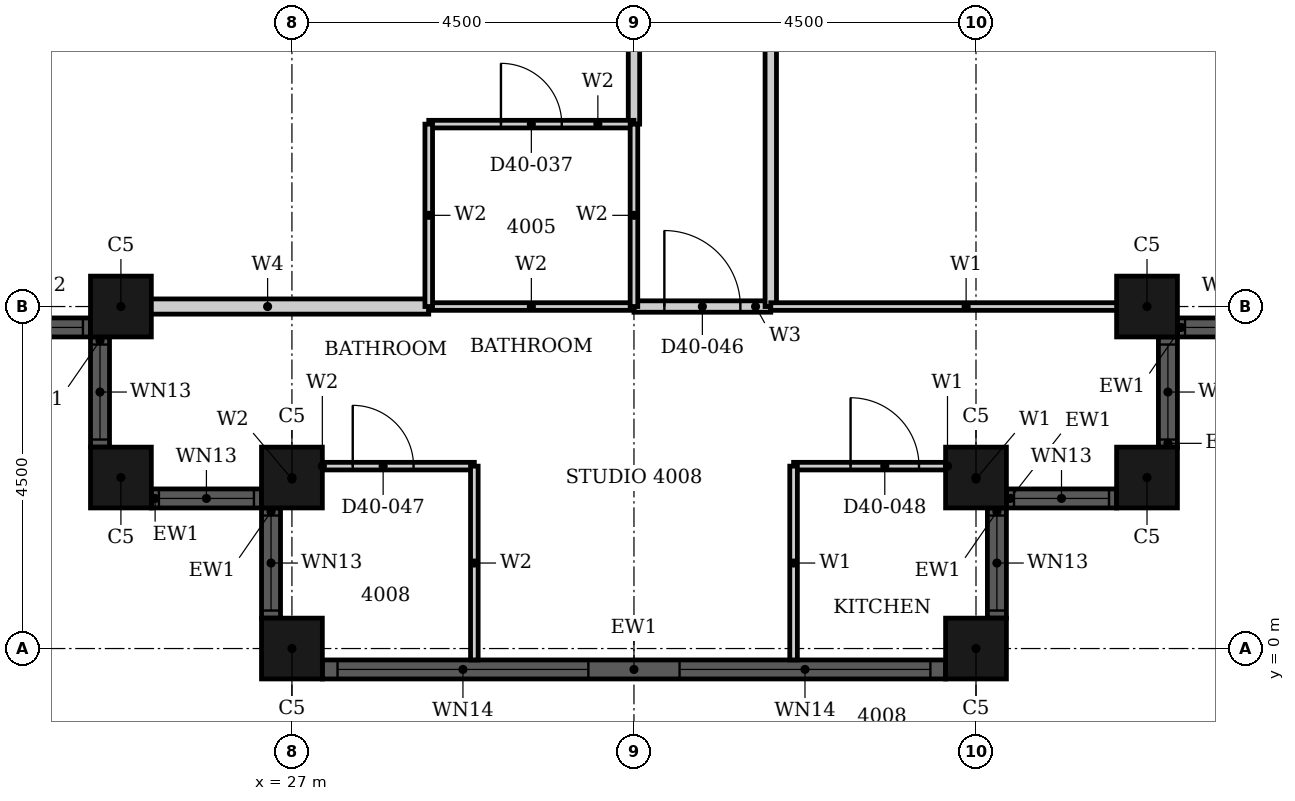
"""IFC4 building model, lengths in metres.
Left out: names, types, materials, properties, quantities, classifications, styles, units other than length and angle.
Written with IfcOpenShell. Run it as: python <this file> out.ifc"""

import sys

from ifc_helpers import new_model, si_unit, direction, frame, frame_2d, origin, origin_2d, place, context, subcontext, project, spatial, rectangle, hollow_rectangle, extrude, element, fill, save


model = new_model("IFC4")
c1 = context("Model", 3, precision=1e-05, world=origin(), true_north=direction((0.0, 1.0)))
c2 = subcontext(c1, "Body", "Model", "MODEL_VIEW")
j1 = project(units=[si_unit("LENGTHUNIT", "METRE"), si_unit("PLANEANGLEUNIT", "RADIAN")], contexts=[c1])
p1 = place(None, origin())
s1 = spatial("IfcSite", under=j1, at=p1, CompositionType="ELEMENT")
p2 = place(p1, origin())
s2 = spatial("IfcBuilding", under=s1, at=p2, CompositionType="ELEMENT")
p3 = place(p2, frame((0.0, 0.0, 161.7)))
s3 = spatial("IfcBuildingStorey", under=s2, at=p3, CompositionType="ELEMENT", Elevation=161.7)
for number, where, z_axis, x_axis in (
    (1, (24.75, 4.5, 0.0), (0.0, 0.0, 1.0), (1.0, 0.0, 0.0)),
    (2, (24.75, 2.25, 0.0), (0.0, 0.0, 1.0), (1.0, 0.0, 0.0)),
    (3, (27.0, 2.25, 0.0), (0.0, 0.0, 1.0), (1.0, 0.0, 0.0)),
    (4, (27.0, 0.0, 0.0), (0.0, 0.0, 1.0), (1.0, 0.0, 0.0)),
    (5, (36.0, 0.0, 0.0), (0.0, 0.0, 1.0), (1.0, 0.0, 0.0)),
    (6, (36.0, 2.25, 0.0), (0.0, 0.0, 1.0), (1.0, 0.0, 0.0)),
    (7, (38.25, 2.25, 0.0), (0.0, 0.0, 1.0), (1.0, 0.0, 0.0)),
    (8, (38.25, 4.5, 0.0), (0.0, 0.0, 1.0), (1.0, 0.0, 0.0)),
):
    element("IfcColumn", number, at=place(p3, frame(where, z_axis=z_axis, x_axis=x_axis)), inside=s3, PredefinedType="COLUMN", context=c2, shape_type="SweptSolid", body=[
        extrude(hollow_rectangle(XDim=0.8, YDim=0.8, WallThickness=0.025, at=origin_2d()), origin(), (0.0, 0.0, 1.0), 3.7),
    ])
p4 = place(p3, frame((22.9, 4.225, 0.0), z_axis=(0.0, 0.0, 1.0), x_axis=(1.0, 0.0, 0.0)))
e9 = element("IfcWall", 9, at=p4, inside=s3, PredefinedType="SOLIDWALL", context=c2, shape_type="SweptSolid", body=[
    extrude(rectangle(XDim=1.45, YDim=0.25, at=frame_2d((0.725, 0.0))), origin(), (0.0, 0.0, 1.0), 3.7),
])
p5 = place(p4, frame((0.1, 0.0, 0.9)))
e10 = element("IfcOpeningElement", 10, at=p5, cuts=e9, PredefinedType="OPENING", context=c2, shape_type="SweptSolid", body=[
    extrude(rectangle(XDim=1.25, YDim=2.08, at=frame_2d((0.625, 1.04))), frame((0.0, 0.135, 0.0), z_axis=(0.0, -1.0, 0.0), x_axis=(1.0, 0.0, 0.0)), (0.0, 0.0, 1.0), 0.27),
])
p6 = place(p3, frame((24.475, 4.1, 0.0), z_axis=(0.0, 0.0, 1.0), x_axis=(0.0, -1.0, 0.0)))
e11 = element("IfcWall", 11, at=p6, inside=s3, PredefinedType="SOLIDWALL", context=c2, shape_type="SweptSolid", body=[
    extrude(rectangle(XDim=1.45, YDim=0.25, at=frame_2d((0.725, 0.0))), origin(), (0.0, 0.0, 1.0), 3.7),
])
p7 = place(p6, frame((0.1, 0.0, 0.9)))
e12 = element("IfcOpeningElement", 12, at=p7, cuts=e11, PredefinedType="OPENING", context=c2, shape_type="SweptSolid", body=[
    extrude(rectangle(XDim=1.25, YDim=1.85, at=frame_2d((0.625, 0.925))), frame((0.0, 0.135, 0.0), z_axis=(0.0, -1.0, 0.0), x_axis=(1.0, 0.0, 0.0)), (0.0, 0.0, 1.0), 0.27),
])
p8 = place(p3, frame((25.15, 1.975, 0.0), z_axis=(0.0, 0.0, 1.0), x_axis=(1.0, 0.0, 0.0)))
e13 = element("IfcWall", 13, at=p8, inside=s3, PredefinedType="SOLIDWALL", context=c2, shape_type="SweptSolid", body=[
    extrude(rectangle(XDim=1.45, YDim=0.25, at=frame_2d((0.725, 0.0))), origin(), (0.0, 0.0, 1.0), 3.7),
])
p9 = place(p8, frame((0.1, 0.0, 0.9)))
e14 = element("IfcOpeningElement", 14, at=p9, cuts=e13, PredefinedType="OPENING", context=c2, shape_type="SweptSolid", body=[
    extrude(rectangle(XDim=1.25, YDim=1.85, at=frame_2d((0.625, 0.925))), frame((0.0, 0.135, 0.0), z_axis=(0.0, -1.0, 0.0), x_axis=(1.0, 0.0, 0.0)), (0.0, 0.0, 1.0), 0.27),
])
p10 = place(p3, frame((26.725, 1.85, 0.0), z_axis=(0.0, 0.0, 1.0), x_axis=(0.0, -1.0, 0.0)))
e15 = element("IfcWall", 15, at=p10, inside=s3, PredefinedType="SOLIDWALL", context=c2, shape_type="SweptSolid", body=[
    extrude(rectangle(XDim=1.45, YDim=0.25, at=frame_2d((0.725, 0.0))), origin(), (0.0, 0.0, 1.0), 3.7),
])
p11 = place(p10, frame((0.1, 0.0, 0.9)))
e16 = element("IfcOpeningElement", 16, at=p11, cuts=e15, PredefinedType="OPENING", context=c2, shape_type="SweptSolid", body=[
    extrude(rectangle(XDim=1.25, YDim=1.85, at=frame_2d((0.625, 0.925))), frame((0.0, 0.135, 0.0), z_axis=(0.0, -1.0, 0.0), x_axis=(1.0, 0.0, 0.0)), (0.0, 0.0, 1.0), 0.27),
])
p12 = place(p3, frame((27.4, -0.275, 0.0), z_axis=(0.0, 0.0, 1.0), x_axis=(1.0, 0.0, 0.0)))
e17 = element("IfcWall", 17, at=p12, inside=s3, PredefinedType="SOLIDWALL", context=c2, shape_type="SweptSolid", body=[
    extrude(rectangle(XDim=8.2, YDim=0.25, at=frame_2d((4.1, 0.0))), origin(), (0.0, 0.0, 1.0), 3.7),
])
p13 = place(p12, frame((0.2, 0.0, 0.45)))
e18 = element("IfcOpeningElement", 18, at=p13, cuts=e17, PredefinedType="OPENING", context=c2, shape_type="SweptSolid", body=[
    extrude(rectangle(XDim=3.3, YDim=2.53, at=frame_2d((1.65, 1.265))), frame((0.0, 0.135, 0.0), z_axis=(0.0, -1.0, 0.0), x_axis=(1.0, 0.0, 0.0)), (0.0, 0.0, 1.0), 0.27),
])
p14 = place(p12, frame((4.7, 0.0, 0.45)))
e19 = element("IfcOpeningElement", 19, at=p14, cuts=e17, PredefinedType="OPENING", context=c2, shape_type="SweptSolid", body=[
    extrude(rectangle(XDim=3.3, YDim=2.53, at=frame_2d((1.65, 1.265))), frame((0.0, 0.135, 0.0), z_axis=(0.0, -1.0, 0.0), x_axis=(1.0, 0.0, 0.0)), (0.0, 0.0, 1.0), 0.27),
])
p15 = place(p3, frame((36.275, 0.4, 0.0), z_axis=(0.0, 0.0, 1.0), x_axis=(0.0, 1.0, 0.0)))
e20 = element("IfcWall", 20, at=p15, inside=s3, PredefinedType="SOLIDWALL", context=c2, shape_type="SweptSolid", body=[
    extrude(rectangle(XDim=1.45, YDim=0.25, at=frame_2d((0.725, 0.0))), origin(), (0.0, 0.0, 1.0), 3.7),
])
p16 = place(p15, frame((0.1, 0.0, 0.9)))
e21 = element("IfcOpeningElement", 21, at=p16, cuts=e20, PredefinedType="OPENING", context=c2, shape_type="SweptSolid", body=[
    extrude(rectangle(XDim=1.25, YDim=1.85, at=frame_2d((0.625, 0.925))), frame((0.0, 0.135, 0.0), z_axis=(0.0, -1.0, 0.0), x_axis=(1.0, 0.0, 0.0)), (0.0, 0.0, 1.0), 0.27),
])
p17 = place(p3, frame((36.4, 1.975, 0.0), z_axis=(0.0, 0.0, 1.0), x_axis=(1.0, 0.0, 0.0)))
e22 = element("IfcWall", 22, at=p17, inside=s3, PredefinedType="SOLIDWALL", context=c2, shape_type="SweptSolid", body=[
    extrude(rectangle(XDim=1.45, YDim=0.25, at=frame_2d((0.725, 0.0))), origin(), (0.0, 0.0, 1.0), 3.7),
])
p18 = place(p17, frame((0.1, 0.0, 0.9)))
e23 = element("IfcOpeningElement", 23, at=p18, cuts=e22, PredefinedType="OPENING", context=c2, shape_type="SweptSolid", body=[
    extrude(rectangle(XDim=1.25, YDim=1.85, at=frame_2d((0.625, 0.925))), frame((0.0, 0.135, 0.0), z_axis=(0.0, -1.0, 0.0), x_axis=(1.0, 0.0, 0.0)), (0.0, 0.0, 1.0), 0.27),
])
p19 = place(p3, frame((38.525, 2.65, 0.0), z_axis=(0.0, 0.0, 1.0), x_axis=(0.0, 1.0, 0.0)))
e24 = element("IfcWall", 24, at=p19, inside=s3, PredefinedType="SOLIDWALL", context=c2, shape_type="SweptSolid", body=[
    extrude(rectangle(XDim=1.45, YDim=0.25, at=frame_2d((0.725, 0.0))), origin(), (0.0, 0.0, 1.0), 3.7),
])
p20 = place(p19, frame((0.1, 0.0, 0.9)))
e25 = element("IfcOpeningElement", 25, at=p20, cuts=e24, PredefinedType="OPENING", context=c2, shape_type="SweptSolid", body=[
    extrude(rectangle(XDim=1.25, YDim=1.85, at=frame_2d((0.625, 0.925))), frame((0.0, 0.135, 0.0), z_axis=(0.0, -1.0, 0.0), x_axis=(1.0, 0.0, 0.0)), (0.0, 0.0, 1.0), 0.27),
])
p21 = place(p3, frame((38.65, 4.225, 0.0), z_axis=(0.0, 0.0, 1.0), x_axis=(1.0, 0.0, 0.0)))
e26 = element("IfcWall", 26, at=p21, inside=s3, PredefinedType="SOLIDWALL", context=c2, shape_type="SweptSolid", body=[
    extrude(rectangle(XDim=1.45, YDim=0.25, at=frame_2d((0.725, 0.0))), origin(), (0.0, 0.0, 1.0), 3.7),
])
p22 = place(p21, frame((0.1, 0.0, 0.9)))
e27 = element("IfcOpeningElement", 27, at=p22, cuts=e26, PredefinedType="OPENING", context=c2, shape_type="SweptSolid", body=[
    extrude(rectangle(XDim=1.25, YDim=2.08, at=frame_2d((0.625, 1.04))), frame((0.0, 0.135, 0.0), z_axis=(0.0, -1.0, 0.0), x_axis=(1.0, 0.0, 0.0)), (0.0, 0.0, 1.0), 0.27),
])
p23 = place(p3, frame((31.5, 4.5, 0.0), z_axis=(0.0, 0.0, 1.0), x_axis=(1.0, 0.0, 0.0)))
e28 = element("IfcWall", 28, at=p23, inside=s3, PredefinedType="PARTITIONING", context=c2, shape_type="SweptSolid", body=[
    extrude(rectangle(XDim=1.8, YDim=0.15, at=frame_2d((0.9, 0.0))), origin(), (0.0, 0.0, 1.0), 3.4),
])
p24 = place(p23, frame((0.4, 0.0, 0.0)))
e29 = element("IfcOpeningElement", 29, at=p24, cuts=e28, PredefinedType="OPENING", context=c2, shape_type="SweptSolid", body=[
    extrude(rectangle(XDim=1.0, YDim=2.2, at=frame_2d((0.5, 1.1))), frame((0.0, 0.085, 0.0), z_axis=(0.0, -1.0, 0.0), x_axis=(1.0, 0.0, 0.0)), (0.0, 0.0, 1.0), 0.17),
])
p25 = place(p3, frame((31.5, 6.9, 0.0), z_axis=(0.0, 0.0, 1.0), x_axis=(0.0, 1.0, 0.0)))
e30 = element("IfcWall", 30, at=p25, inside=s3, PredefinedType="PARTITIONING", context=c2, shape_type="SweptSolid", body=[
    extrude(rectangle(XDim=13.8, YDim=0.15, at=frame_2d((6.9, 0.0))), origin(), (0.0, 0.0, 1.0), 2.68),
])
p26 = place(p25, frame((1.3, 0.0, 0.0)))
e31 = element("IfcOpeningElement", 31, at=p26, cuts=e30, PredefinedType="OPENING", context=c2, shape_type="SweptSolid", body=[
    extrude(rectangle(XDim=1.0, YDim=2.2, at=frame_2d((0.5, 1.1))), frame((0.0, 0.085, 0.0), z_axis=(0.0, -1.0, 0.0), x_axis=(1.0, 0.0, 0.0)), (0.0, 0.0, 1.0), 0.17),
])
p27 = place(p3, frame((33.3, 4.5, 0.0), z_axis=(0.0, 0.0, 1.0), x_axis=(0.0, 1.0, 0.0)))
e32 = element("IfcWall", 32, at=p27, inside=s3, PredefinedType="PARTITIONING", context=c2, shape_type="SweptSolid", body=[
    extrude(rectangle(XDim=16.199, YDim=0.15, at=frame_2d((8.1, 0.0))), origin(), (0.0, 0.0, 1.0), 3.4),
])
p28 = place(p27, frame((12.099, 0.0, 0.0)))
e33 = element("IfcOpeningElement", 33, at=p28, cuts=e32, PredefinedType="OPENING", context=c2, shape_type="SweptSolid", body=[
    extrude(rectangle(XDim=1.0, YDim=2.2, at=frame_2d((0.5, 1.1))), frame((0.0, 0.085, 0.0), z_axis=(0.0, -1.0, 0.0), x_axis=(1.0, 0.0, 0.0)), (0.0, 0.0, 1.0), 0.17),
])
p29 = place(p27, frame((4.0, 0.0, 0.0)))
e34 = element("IfcOpeningElement", 34, at=p29, cuts=e32, PredefinedType="OPENING", context=c2, shape_type="SweptSolid", body=[
    extrude(rectangle(XDim=1.0, YDim=2.1, at=frame_2d((0.5, 1.05))), frame((0.0, 0.085, 0.0), z_axis=(0.0, -1.0, 0.0), x_axis=(1.0, 0.0, 0.0)), (0.0, 0.0, 1.0), 0.17),
])
p30 = place(p3, frame((33.6, 2.4, 0.0), z_axis=(0.0, 0.0, 1.0), x_axis=(1.0, 0.0, 0.0)))
e35 = element("IfcWall", 35, at=p30, inside=s3, PredefinedType="PARTITIONING", context=c2, shape_type="SweptSolid", body=[
    extrude(rectangle(XDim=2.4, YDim=0.1, at=frame_2d((1.2, 0.0))), origin(), (0.0, 0.0, 1.0), 3.4),
])
p31 = place(p30, frame((0.75, 0.0, 0.0)))
e36 = element("IfcOpeningElement", 36, at=p31, cuts=e35, PredefinedType="OPENING", context=c2, shape_type="SweptSolid", body=[
    extrude(rectangle(XDim=0.9, YDim=2.1, at=frame_2d((0.45, 1.05))), frame((0.0, 0.06, 0.0), z_axis=(0.0, -1.0, 0.0), x_axis=(1.0, 0.0, 0.0)), (0.0, 0.0, 1.0), 0.12),
])
p32 = place(p3, frame((33.3, 4.5, 0.0), z_axis=(0.0, 0.0, 1.0), x_axis=(1.0, 0.0, 0.0)))
e37 = element("IfcWall", 37, at=p32, inside=s3, PredefinedType="PARTITIONING", context=c2, shape_type="SweptSolid", body=[
    extrude(rectangle(XDim=5.14, YDim=0.1, at=frame_2d((2.57, 0.0))), origin(), (0.0, 0.0, 1.0), 3.4),
])
p33 = place(p3, frame((33.6, -0.15, 0.0), z_axis=(0.0, 0.0, 1.0), x_axis=(0.0, 1.0, 0.0)))
e38 = element("IfcWall", 38, at=p33, inside=s3, PredefinedType="PARTITIONING", context=c2, shape_type="SweptSolid", body=[
    extrude(rectangle(XDim=2.55, YDim=0.1, at=frame_2d((1.275, 0.0))), origin(), (0.0, 0.0, 1.0), 3.4),
])
p34 = place(p3, frame((36.0, 2.06, 0.0), z_axis=(0.0, 0.0, 1.0), x_axis=(0.0, 1.0, 0.0)))
e39 = element("IfcWall", 39, at=p34, inside=s3, PredefinedType="PARTITIONING", context=c2, shape_type="SweptSolid", body=[
    extrude(rectangle(XDim=0.34, YDim=0.1, at=frame_2d((0.17, 0.0))), origin(), (0.0, 0.0, 1.0), 3.4),
])
p35 = place(p3, frame((24.56, 4.5, 0.0), z_axis=(0.0, 0.0, 1.0), x_axis=(1.0, 0.0, 0.0)))
e40 = element("IfcWall", 40, at=p35, inside=s3, PredefinedType="PARTITIONING", context=c2, shape_type="SweptSolid", body=[
    extrude(rectangle(XDim=4.24, YDim=0.2, at=frame_2d((2.12, 0.0))), origin(), (0.0, 0.0, 1.0), 3.4),
])
p36 = place(p3, frame((27.0, 2.4, 0.0), z_axis=(0.0, 0.0, 1.0), x_axis=(1.0, 0.0, 0.0)))
e41 = element("IfcWall", 41, at=p36, inside=s3, PredefinedType="PARTITIONING", context=c2, shape_type="SweptSolid", body=[
    extrude(rectangle(XDim=2.4, YDim=0.1, at=frame_2d((1.2, 0.0))), origin(), (0.0, 0.0, 1.0), 3.4),
])
p37 = place(p36, frame((0.8, 0.0, 0.0)))
e42 = element("IfcOpeningElement", 42, at=p37, cuts=e41, PredefinedType="OPENING", context=c2, shape_type="SweptSolid", body=[
    extrude(rectangle(XDim=0.8, YDim=2.1, at=frame_2d((0.4, 1.05))), frame((0.0, 0.06, 0.0), z_axis=(0.0, -1.0, 0.0), x_axis=(1.0, 0.0, 0.0)), (0.0, 0.0, 1.0), 0.12),
])
p38 = place(p3, frame((28.8, 4.5, 0.0), z_axis=(0.0, 0.0, 1.0), x_axis=(1.0, 0.0, 0.0)))
e43 = element("IfcWall", 43, at=p38, inside=s3, PredefinedType="PARTITIONING", context=c2, shape_type="SweptSolid", body=[
    extrude(rectangle(XDim=2.7, YDim=0.1, at=frame_2d((1.35, 0.0))), origin(), (0.0, 0.0, 1.0), 3.4),
])
p39 = place(p3, frame((28.8, 6.9, 0.0), z_axis=(0.0, 0.0, 1.0), x_axis=(1.0, 0.0, 0.0)))
e44 = element("IfcWall", 44, at=p39, inside=s3, PredefinedType="PARTITIONING", context=c2, shape_type="SweptSolid", body=[
    extrude(rectangle(XDim=2.7, YDim=0.1, at=frame_2d((1.35, 0.0))), origin(), (0.0, 0.0, 1.0), 3.4),
])
p40 = place(p39, frame((0.95, 0.0, 0.0)))
e45 = element("IfcOpeningElement", 45, at=p40, cuts=e44, PredefinedType="OPENING", context=c2, shape_type="SweptSolid", body=[
    extrude(rectangle(XDim=0.8, YDim=2.1, at=frame_2d((0.4, 1.05))), frame((0.0, 0.06, 0.0), z_axis=(0.0, -1.0, 0.0), x_axis=(1.0, 0.0, 0.0)), (0.0, 0.0, 1.0), 0.12),
])
p41 = place(p3, frame((27.0, 2.06, 0.0), z_axis=(0.0, 0.0, 1.0), x_axis=(0.0, 1.0, 0.0)))
e46 = element("IfcWall", 46, at=p41, inside=s3, PredefinedType="PARTITIONING", context=c2, shape_type="SweptSolid", body=[
    extrude(rectangle(XDim=0.34, YDim=0.1, at=frame_2d((0.17, 0.0))), origin(), (0.0, 0.0, 1.0), 3.4),
])
p42 = place(p3, frame((28.8, 4.5, 0.0), z_axis=(0.0, 0.0, 1.0), x_axis=(0.0, 1.0, 0.0)))
e47 = element("IfcWall", 47, at=p42, inside=s3, PredefinedType="PARTITIONING", context=c2, shape_type="SweptSolid", body=[
    extrude(rectangle(XDim=2.4, YDim=0.1, at=frame_2d((1.2, 0.0))), origin(), (0.0, 0.0, 1.0), 3.4),
])
p43 = place(p3, frame((29.4, -0.15, 0.0), z_axis=(0.0, 0.0, 1.0), x_axis=(0.0, 1.0, 0.0)))
e48 = element("IfcWall", 48, at=p43, inside=s3, PredefinedType="PARTITIONING", context=c2, shape_type="SweptSolid", body=[
    extrude(rectangle(XDim=2.55, YDim=0.1, at=frame_2d((1.275, 0.0))), origin(), (0.0, 0.0, 1.0), 3.4),
])
p44 = place(p3, frame((31.5, 4.5, 0.0), z_axis=(0.0, 0.0, 1.0), x_axis=(0.0, 1.0, 0.0)))
e49 = element("IfcWall", 49, at=p44, inside=s3, PredefinedType="PARTITIONING", context=c2, shape_type="SweptSolid", body=[
    extrude(rectangle(XDim=2.4, YDim=0.1, at=frame_2d((1.2, 0.0))), origin(), (0.0, 0.0, 1.0), 2.68),
])
p45 = place(p5, origin())
e50 = element("IfcWindow", 50, at=p45, inside=s3, PartitioningType="SINGLE_PANEL", PredefinedType="WINDOW", context=c2, shape_type="SweptSolid", body=[
    extrude(rectangle(XDim=1.25, YDim=2.08, at=frame_2d((0.625, 1.04))), frame((0.0, 0.03, 0.0), z_axis=(0.0, -1.0, 0.0), x_axis=(1.0, 0.0, 0.0)), (0.0, 0.0, 1.0), 0.06),
])
fill(e10, e50)
p46 = place(p7, origin())
e51 = element("IfcWindow", 51, at=p46, inside=s3, PartitioningType="SINGLE_PANEL", PredefinedType="WINDOW", context=c2, shape_type="SweptSolid", body=[
    extrude(rectangle(XDim=1.25, YDim=1.85, at=frame_2d((0.625, 0.925))), frame((0.0, 0.03, 0.0), z_axis=(0.0, -1.0, 0.0), x_axis=(1.0, 0.0, 0.0)), (0.0, 0.0, 1.0), 0.06),
])
fill(e12, e51)
p47 = place(p9, origin())
e52 = element("IfcWindow", 52, at=p47, inside=s3, PartitioningType="SINGLE_PANEL", PredefinedType="WINDOW", context=c2, shape_type="SweptSolid", body=[
    extrude(rectangle(XDim=1.25, YDim=1.85, at=frame_2d((0.625, 0.925))), frame((0.0, 0.03, 0.0), z_axis=(0.0, -1.0, 0.0), x_axis=(1.0, 0.0, 0.0)), (0.0, 0.0, 1.0), 0.06),
])
fill(e14, e52)
p48 = place(p11, origin())
e53 = element("IfcWindow", 53, at=p48, inside=s3, PartitioningType="SINGLE_PANEL", PredefinedType="WINDOW", context=c2, shape_type="SweptSolid", body=[
    extrude(rectangle(XDim=1.25, YDim=1.85, at=frame_2d((0.625, 0.925))), frame((0.0, 0.03, 0.0), z_axis=(0.0, -1.0, 0.0), x_axis=(1.0, 0.0, 0.0)), (0.0, 0.0, 1.0), 0.06),
])
fill(e16, e53)
p49 = place(p13, origin())
e54 = element("IfcWindow", 54, at=p49, inside=s3, PartitioningType="SINGLE_PANEL", PredefinedType="WINDOW", context=c2, shape_type="SweptSolid", body=[
    extrude(rectangle(XDim=3.3, YDim=2.53, at=frame_2d((1.65, 1.265))), frame((0.0, 0.03, 0.0), z_axis=(0.0, -1.0, 0.0), x_axis=(1.0, 0.0, 0.0)), (0.0, 0.0, 1.0), 0.06),
])
fill(e18, e54)
p50 = place(p14, origin())
e55 = element("IfcWindow", 55, at=p50, inside=s3, PartitioningType="SINGLE_PANEL", PredefinedType="WINDOW", context=c2, shape_type="SweptSolid", body=[
    extrude(rectangle(XDim=3.3, YDim=2.53, at=frame_2d((1.65, 1.265))), frame((0.0, 0.03, 0.0), z_axis=(0.0, -1.0, 0.0), x_axis=(1.0, 0.0, 0.0)), (0.0, 0.0, 1.0), 0.06),
])
fill(e19, e55)
p51 = place(p16, origin())
e56 = element("IfcWindow", 56, at=p51, inside=s3, PartitioningType="SINGLE_PANEL", PredefinedType="WINDOW", context=c2, shape_type="SweptSolid", body=[
    extrude(rectangle(XDim=1.25, YDim=1.85, at=frame_2d((0.625, 0.925))), frame((0.0, 0.03, 0.0), z_axis=(0.0, -1.0, 0.0), x_axis=(1.0, 0.0, 0.0)), (0.0, 0.0, 1.0), 0.06),
])
fill(e21, e56)
p52 = place(p18, origin())
e57 = element("IfcWindow", 57, at=p52, inside=s3, PartitioningType="SINGLE_PANEL", PredefinedType="WINDOW", context=c2, shape_type="SweptSolid", body=[
    extrude(rectangle(XDim=1.25, YDim=1.85, at=frame_2d((0.625, 0.925))), frame((0.0, 0.03, 0.0), z_axis=(0.0, -1.0, 0.0), x_axis=(1.0, 0.0, 0.0)), (0.0, 0.0, 1.0), 0.06),
])
fill(e23, e57)
p53 = place(p20, origin())
e58 = element("IfcWindow", 58, at=p53, inside=s3, PartitioningType="SINGLE_PANEL", PredefinedType="WINDOW", context=c2, shape_type="SweptSolid", body=[
    extrude(rectangle(XDim=1.25, YDim=1.85, at=frame_2d((0.625, 0.925))), frame((0.0, 0.03, 0.0), z_axis=(0.0, -1.0, 0.0), x_axis=(1.0, 0.0, 0.0)), (0.0, 0.0, 1.0), 0.06),
])
fill(e25, e58)
p54 = place(p22, origin())
e59 = element("IfcWindow", 59, at=p54, inside=s3, PartitioningType="SINGLE_PANEL", PredefinedType="WINDOW", context=c2, shape_type="SweptSolid", body=[
    extrude(rectangle(XDim=1.25, YDim=2.08, at=frame_2d((0.625, 1.04))), frame((0.0, 0.03, 0.0), z_axis=(0.0, -1.0, 0.0), x_axis=(1.0, 0.0, 0.0)), (0.0, 0.0, 1.0), 0.06),
])
fill(e27, e59)
p55 = place(p40, origin())
e60 = element("IfcDoor", 60, at=p55, inside=s3, OperationType="SINGLE_SWING_LEFT", PredefinedType="DOOR", context=c2, shape_type="SweptSolid", body=[
    extrude(rectangle(XDim=0.8, YDim=2.1, at=frame_2d((0.4, 1.05))), frame((0.0, 0.025, 0.0), z_axis=(0.0, -1.0, 0.0), x_axis=(1.0, 0.0, 0.0)), (0.0, 0.0, 1.0), 0.05),
])
fill(e45, e60)
p56 = place(p24, origin())
e61 = element("IfcDoor", 61, at=p56, inside=s3, OperationType="SINGLE_SWING_RIGHT", PredefinedType="DOOR", context=c2, shape_type="SweptSolid", body=[
    extrude(rectangle(XDim=1.0, YDim=2.2, at=frame_2d((0.5, 1.1))), frame((0.0, 0.025, 0.0), z_axis=(0.0, -1.0, 0.0), x_axis=(1.0, 0.0, 0.0)), (0.0, 0.0, 1.0), 0.05),
])
fill(e29, e61)
p57 = place(p37, origin())
e62 = element("IfcDoor", 62, at=p57, inside=s3, OperationType="SINGLE_SWING_LEFT", PredefinedType="DOOR", context=c2, shape_type="SweptSolid", body=[
    extrude(rectangle(XDim=0.8, YDim=2.1, at=frame_2d((0.4, 1.05))), frame((0.0, 0.025, 0.0), z_axis=(0.0, -1.0, 0.0), x_axis=(1.0, 0.0, 0.0)), (0.0, 0.0, 1.0), 0.05),
])
fill(e42, e62)
p58 = place(p31, origin())
e63 = element("IfcDoor", 63, at=p58, inside=s3, OperationType="SINGLE_SWING_RIGHT", PredefinedType="DOOR", context=c2, shape_type="SweptSolid", body=[
    extrude(rectangle(XDim=0.9, YDim=2.1, at=frame_2d((0.45, 1.05))), frame((0.0, 0.025, 0.0), z_axis=(0.0, -1.0, 0.0), x_axis=(1.0, 0.0, 0.0)), (0.0, 0.0, 1.0), 0.05),
])
fill(e36, e63)
save(model, sys.argv[1])
